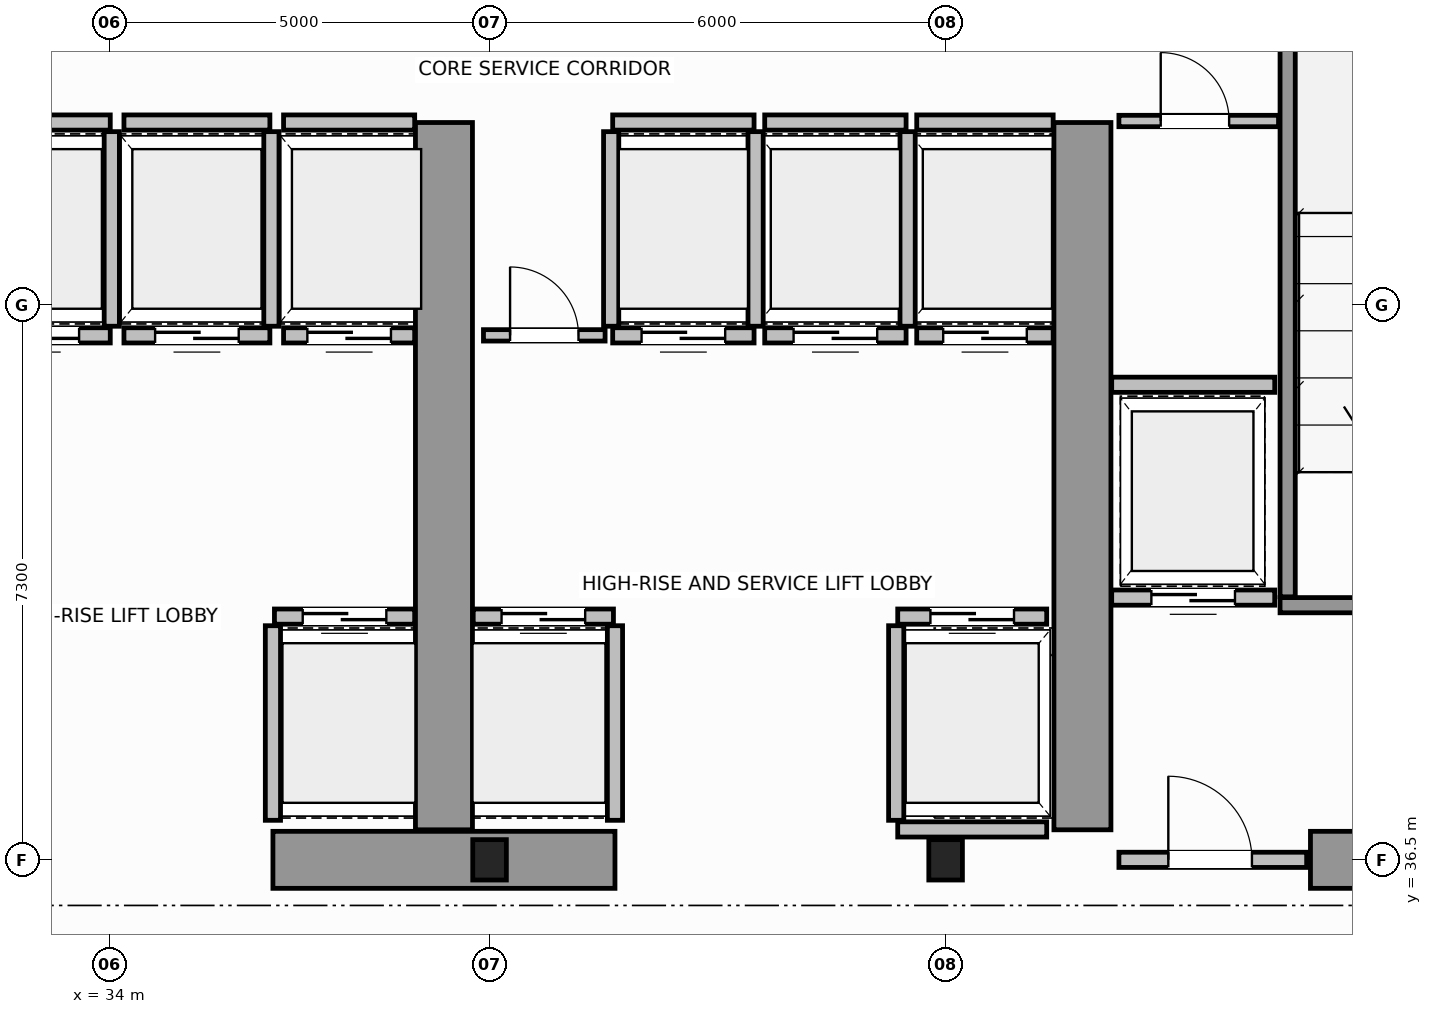
"""IFC4 building model, lengths in metres.
Left out: names, types, materials, properties, quantities, classifications, styles, units other than length and angle.
Written with IfcOpenShell. Run it as: python <this file> out.ifc"""

import sys

from ifc_helpers import new_model, si_unit, direction, frame, frame_2d, origin, origin_2d, place, context, subcontext, project, spatial, rectangle, i_section, extrude, source, transform, mapped, element, fill, save


model = new_model("IFC4")
c1 = context("Model", 3, precision=1e-05, world=origin(), true_north=direction((0.0, 1.0)))
c2 = subcontext(c1, "Body", "Model", "MODEL_VIEW")
j1 = project(units=[si_unit("LENGTHUNIT", "METRE"), si_unit("PLANEANGLEUNIT", "RADIAN")], contexts=[c1])
p1 = place(None, origin())
s1 = spatial("IfcSite", under=j1, at=p1, CompositionType="ELEMENT")
p2 = place(p1, origin())
s2 = spatial("IfcBuilding", under=s1, at=p2, CompositionType="ELEMENT")
p3 = place(p2, frame((0.0, 0.0, 99.6)))
s3 = spatial("IfcBuildingStorey", under=s2, at=p3, CompositionType="ELEMENT", Elevation=99.6)
m1 = source(origin(), c2, "Body", "SweptSolid", [
    extrude(i_section(OverallWidth=0.442, OverallDepth=0.531, WebThickness=0.065, FlangeThickness=0.076, FilletRadius=0.015, at=origin_2d()), origin(), (0.0, 0.0, 1.0), 3.8),
])
for number, where, z_axis, x_axis in (
    (1, (39.0, 36.5, 0.0), (0.0, 0.0, 1.0), (1.0, 0.0, 0.0)),
    (2, (45.0, 36.5, 0.0), (0.0, 0.0, 1.0), (1.0, 0.0, 0.0)),
):
    element("IfcColumn", number, at=place(p3, frame(where, z_axis=z_axis, x_axis=x_axis)), inside=s3, PredefinedType="COLUMN", context=c2, shape_type="MappedRepresentation", body=[
        mapped(m1, transform((0.0, 0.0, 0.0), scale=1.0)),
    ])
p4 = place(p3, frame((36.15, 36.5, 0.0), z_axis=(0.0, 0.0, 1.0), x_axis=(1.0, 0.0, 0.0)))
e3 = element("IfcWall", 3, at=p4, inside=s3, PredefinedType="SHEAR", context=c2, shape_type="SweptSolid", body=[
    extrude(rectangle(XDim=4.5, YDim=0.75, at=frame_2d((2.25, 0.0))), origin(), (0.0, 0.0, 1.0), 3.8),
])
p5 = place(p3, frame((49.8, 36.5, 0.0), z_axis=(0.0, 0.0, 1.0), x_axis=(1.0, 0.0, 0.0)))
e4 = element("IfcWall", 4, at=p5, inside=s3, PredefinedType="SHEAR", context=c2, shape_type="SweptSolid", body=[
    extrude(rectangle(XDim=3.805, YDim=0.75, at=frame_2d((1.902, 0.0))), origin(), (0.0, 0.0, 1.0), 2.38),
])
for number, where, z_axis, x_axis in (
    (5, (38.4, 36.895, 0.0), (0.0, 0.0, 1.0), (0.0, 1.0, 0.0)),
    (6, (46.8, 36.895, 0.0), (0.0, 0.0, 1.0), (0.0, 1.0, 0.0)),
):
    element("IfcWall", number, at=place(p3, frame(where, z_axis=z_axis, x_axis=x_axis)), inside=s3, PredefinedType="SHEAR", context=c2, shape_type="SweptSolid", body=[
        extrude(rectangle(XDim=9.305, YDim=0.75, at=frame_2d((4.652, 0.0))), origin(), (0.0, 0.0, 1.0), 3.8),
    ])
p6 = place(p3, frame((49.4, 39.85, 0.0), z_axis=(0.0, 0.0, 1.0), x_axis=(1.0, 0.0, 0.0)))
e7 = element("IfcWall", 7, at=p6, inside=s3, PredefinedType="SOLIDWALL", context=c2, shape_type="SweptSolid", body=[
    extrude(rectangle(XDim=4.225, YDim=0.2, at=frame_2d((2.113, 0.0))), origin(), (0.0, 0.0, 1.0), 3.8),
])
p7 = place(p6, frame((1.325, 0.0, 0.0)))
e8 = element("IfcOpeningElement", 8, at=p7, cuts=e7, PredefinedType="OPENING", context=c2, shape_type="SweptSolid", body=[
    extrude(rectangle(XDim=1.1, YDim=2.15, at=frame_2d((0.55, 1.075))), frame((0.0, 0.11, 0.0), z_axis=(0.0, -1.0, 0.0), x_axis=(1.0, 0.0, 0.0)), (0.0, 0.0, 1.0), 0.22),
])
p8 = place(p3, frame((49.5, 39.96, 0.0), z_axis=(0.0, 0.0, 1.0), x_axis=(0.0, 1.0, 0.0)))
e9 = element("IfcWall", 9, at=p8, inside=s3, PredefinedType="SOLIDWALL", context=c2, shape_type="SweptSolid", body=[
    extrude(rectangle(XDim=9.93, YDim=0.2, at=frame_2d((4.965, 0.0))), origin(), (0.0, 0.0, 1.0), 3.8),
])
p9 = place(p3, frame((47.28, 36.5, 0.0), z_axis=(0.0, 0.0, 1.0), x_axis=(1.0, 0.0, 0.0)))
e10 = element("IfcWall", 10, at=p9, inside=s3, PredefinedType="SOLIDWALL", context=c2, shape_type="SweptSolid", body=[
    extrude(rectangle(XDim=2.47, YDim=0.2, at=frame_2d((1.235, 0.0))), origin(), (0.0, 0.0, 1.0), 2.37),
])
p10 = place(p9, frame((0.65, 0.0, 0.0)))
e11 = element("IfcOpeningElement", 11, at=p10, cuts=e10, PredefinedType="OPENING", context=c2, shape_type="SweptSolid", body=[
    extrude(rectangle(XDim=1.1, YDim=2.15, at=frame_2d((0.55, 1.075))), frame((0.0, 0.11, 0.0), z_axis=(0.0, -1.0, 0.0), x_axis=(1.0, 0.0, 0.0)), (0.0, 0.0, 1.0), 0.22),
])
p11 = place(p3, frame((36.17, 39.7, 0.0), z_axis=(0.0, 0.0, 1.0), x_axis=(1.0, 0.0, 0.0)))
e12 = element("IfcWall", 12, at=p11, inside=s3, PredefinedType="SOLIDWALL", context=c2, shape_type="SweptSolid", body=[
    extrude(rectangle(XDim=1.845, YDim=0.2, at=frame_2d((0.922, 0.0))), origin(), (0.0, 0.0, 1.0), 3.58),
])
p12 = place(p11, frame((0.372, 0.0, 0.0)))
e13 = element("IfcOpeningElement", 13, at=p12, cuts=e12, PredefinedType="OPENING", context=c2, shape_type="SweptSolid", body=[
    extrude(rectangle(XDim=1.1, YDim=2.15, at=frame_2d((0.55, 1.075))), frame((0.0, 0.11, 0.0), z_axis=(0.0, -1.0, 0.0), x_axis=(1.0, 0.0, 0.0)), (0.0, 0.0, 1.0), 0.22),
])
p13 = place(p3, frame((36.15, 37.02, 0.0), z_axis=(0.0, 0.0, 1.0), x_axis=(0.0, 1.0, 0.0)))
e14 = element("IfcWall", 14, at=p13, inside=s3, PredefinedType="SOLIDWALL", context=c2, shape_type="SweptSolid", body=[
    extrude(rectangle(XDim=2.56, YDim=0.2, at=frame_2d((1.28, 0.0))), origin(), (0.0, 0.0, 1.0), 3.58),
])
p14 = place(p3, frame((32.09, 43.4, 0.0), z_axis=(0.0, 0.0, 1.0), x_axis=(1.0, 0.0, 0.0)))
e15 = element("IfcWall", 15, at=p14, inside=s3, PredefinedType="SOLIDWALL", context=c2, shape_type="SweptSolid", body=[
    extrude(rectangle(XDim=1.92, YDim=0.2, at=frame_2d((0.96, 0.0))), origin(), (0.0, 0.0, 1.0), 3.58),
])
p15 = place(p14, frame((0.41, 0.0, 0.0)))
e16 = element("IfcOpeningElement", 16, at=p15, cuts=e15, PredefinedType="OPENING", context=c2, shape_type="SweptSolid", body=[
    extrude(rectangle(XDim=1.1, YDim=2.15, at=frame_2d((0.55, 1.075))), frame((0.0, 0.11, 0.0), z_axis=(0.0, -1.0, 0.0), x_axis=(1.0, 0.0, 0.0)), (0.0, 0.0, 1.0), 0.22),
])
p16 = place(p3, frame((32.09, 46.2, 0.0), z_axis=(0.0, 0.0, 1.0), x_axis=(1.0, 0.0, 0.0)))
e17 = element("IfcWall", 17, at=p16, inside=s3, PredefinedType="SOLIDWALL", context=c2, shape_type="SweptSolid", body=[
    extrude(rectangle(XDim=1.92, YDim=0.2, at=frame_2d((0.96, 0.0))), origin(), (0.0, 0.0, 1.0), 3.58),
])
p17 = place(p3, frame((34.03, 43.52, 0.0), z_axis=(0.0, 0.0, 1.0), x_axis=(0.0, 1.0, 0.0)))
e18 = element("IfcWall", 18, at=p17, inside=s3, PredefinedType="SOLIDWALL", context=c2, shape_type="SweptSolid", body=[
    extrude(rectangle(XDim=2.56, YDim=0.2, at=frame_2d((1.28, 0.0))), origin(), (0.0, 0.0, 1.0), 3.58),
])
p18 = place(p3, frame((34.19, 43.4, 0.0), z_axis=(0.0, 0.0, 1.0), x_axis=(1.0, 0.0, 0.0)))
e19 = element("IfcWall", 19, at=p18, inside=s3, PredefinedType="SOLIDWALL", context=c2, shape_type="SweptSolid", body=[
    extrude(rectangle(XDim=1.92, YDim=0.2, at=frame_2d((0.96, 0.0))), origin(), (0.0, 0.0, 1.0), 3.58),
])
p19 = place(p18, frame((0.41, 0.0, 0.0)))
e20 = element("IfcOpeningElement", 20, at=p19, cuts=e19, PredefinedType="OPENING", context=c2, shape_type="SweptSolid", body=[
    extrude(rectangle(XDim=1.1, YDim=2.15, at=frame_2d((0.55, 1.075))), frame((0.0, 0.11, 0.0), z_axis=(0.0, -1.0, 0.0), x_axis=(1.0, 0.0, 0.0)), (0.0, 0.0, 1.0), 0.22),
])
p20 = place(p3, frame((34.19, 46.2, 0.0), z_axis=(0.0, 0.0, 1.0), x_axis=(1.0, 0.0, 0.0)))
e21 = element("IfcWall", 21, at=p20, inside=s3, PredefinedType="SOLIDWALL", context=c2, shape_type="SweptSolid", body=[
    extrude(rectangle(XDim=1.92, YDim=0.2, at=frame_2d((0.96, 0.0))), origin(), (0.0, 0.0, 1.0), 3.58),
])
p21 = place(p3, frame((36.13, 43.52, 0.0), z_axis=(0.0, 0.0, 1.0), x_axis=(0.0, 1.0, 0.0)))
e22 = element("IfcWall", 22, at=p21, inside=s3, PredefinedType="SOLIDWALL", context=c2, shape_type="SweptSolid", body=[
    extrude(rectangle(XDim=2.56, YDim=0.2, at=frame_2d((1.28, 0.0))), origin(), (0.0, 0.0, 1.0), 3.58),
])
p22 = place(p3, frame((36.29, 43.4, 0.0), z_axis=(0.0, 0.0, 1.0), x_axis=(1.0, 0.0, 0.0)))
e23 = element("IfcWall", 23, at=p22, inside=s3, PredefinedType="SOLIDWALL", context=c2, shape_type="SweptSolid", body=[
    extrude(rectangle(XDim=1.725, YDim=0.2, at=frame_2d((0.862, 0.0))), origin(), (0.0, 0.0, 1.0), 3.58),
])
p23 = place(p22, frame((0.313, 0.0, 0.0)))
e24 = element("IfcOpeningElement", 24, at=p23, cuts=e23, PredefinedType="OPENING", context=c2, shape_type="SweptSolid", body=[
    extrude(rectangle(XDim=1.1, YDim=2.15, at=frame_2d((0.55, 1.075))), frame((0.0, 0.11, 0.0), z_axis=(0.0, -1.0, 0.0), x_axis=(1.0, 0.0, 0.0)), (0.0, 0.0, 1.0), 0.22),
])
p24 = place(p3, frame((36.29, 46.2, 0.0), z_axis=(0.0, 0.0, 1.0), x_axis=(1.0, 0.0, 0.0)))
e25 = element("IfcWall", 25, at=p24, inside=s3, PredefinedType="SOLIDWALL", context=c2, shape_type="SweptSolid", body=[
    extrude(rectangle(XDim=1.725, YDim=0.2, at=frame_2d((0.862, 0.0))), origin(), (0.0, 0.0, 1.0), 3.58),
])
p25 = place(p3, frame((38.785, 39.7, 0.0), z_axis=(0.0, 0.0, 1.0), x_axis=(1.0, 0.0, 0.0)))
e26 = element("IfcWall", 26, at=p25, inside=s3, PredefinedType="SOLIDWALL", context=c2, shape_type="SweptSolid", body=[
    extrude(rectangle(XDim=1.845, YDim=0.2, at=frame_2d((0.922, 0.0))), origin(), (0.0, 0.0, 1.0), 3.58),
])
p26 = place(p25, frame((0.373, 0.0, 0.0)))
e27 = element("IfcOpeningElement", 27, at=p26, cuts=e26, PredefinedType="OPENING", context=c2, shape_type="SweptSolid", body=[
    extrude(rectangle(XDim=1.1, YDim=2.15, at=frame_2d((0.55, 1.075))), frame((0.0, 0.11, 0.0), z_axis=(0.0, -1.0, 0.0), x_axis=(1.0, 0.0, 0.0)), (0.0, 0.0, 1.0), 0.22),
])
p27 = place(p3, frame((40.65, 37.02, 0.0), z_axis=(0.0, 0.0, 1.0), x_axis=(0.0, 1.0, 0.0)))
e28 = element("IfcWall", 28, at=p27, inside=s3, PredefinedType="SOLIDWALL", context=c2, shape_type="SweptSolid", body=[
    extrude(rectangle(XDim=2.56, YDim=0.2, at=frame_2d((1.28, 0.0))), origin(), (0.0, 0.0, 1.0), 3.58),
])
p28 = place(p3, frame((44.37, 39.7, 0.0), z_axis=(0.0, 0.0, 1.0), x_axis=(1.0, 0.0, 0.0)))
e29 = element("IfcWall", 29, at=p28, inside=s3, PredefinedType="SOLIDWALL", context=c2, shape_type="SweptSolid", body=[
    extrude(rectangle(XDim=1.96, YDim=0.2, at=frame_2d((0.98, 0.0))), origin(), (0.0, 0.0, 1.0), 3.58),
])
p29 = place(p28, frame((0.43, 0.0, 0.0)))
e30 = element("IfcOpeningElement", 30, at=p29, cuts=e29, PredefinedType="OPENING", context=c2, shape_type="SweptSolid", body=[
    extrude(rectangle(XDim=1.1, YDim=2.15, at=frame_2d((0.55, 1.075))), frame((0.0, 0.11, 0.0), z_axis=(0.0, -1.0, 0.0), x_axis=(1.0, 0.0, 0.0)), (0.0, 0.0, 1.0), 0.22),
])
p30 = place(p3, frame((44.37, 36.9, 0.0), z_axis=(0.0, 0.0, 1.0), x_axis=(1.0, 0.0, 0.0)))
e31 = element("IfcWall", 31, at=p30, inside=s3, PredefinedType="SOLIDWALL", context=c2, shape_type="SweptSolid", body=[
    extrude(rectangle(XDim=1.96, YDim=0.2, at=frame_2d((0.98, 0.0))), origin(), (0.0, 0.0, 1.0), 2.37),
])
p31 = place(p3, frame((44.35, 37.02, 0.0), z_axis=(0.0, 0.0, 1.0), x_axis=(0.0, 1.0, 0.0)))
e32 = element("IfcWall", 32, at=p31, inside=s3, PredefinedType="SOLIDWALL", context=c2, shape_type="SweptSolid", body=[
    extrude(rectangle(XDim=2.56, YDim=0.2, at=frame_2d((1.28, 0.0))), origin(), (0.0, 0.0, 1.0), 3.58),
])
p32 = place(p3, frame((40.62, 43.4, 0.0), z_axis=(0.0, 0.0, 1.0), x_axis=(1.0, 0.0, 0.0)))
e33 = element("IfcWall", 33, at=p32, inside=s3, PredefinedType="SOLIDWALL", context=c2, shape_type="SweptSolid", body=[
    extrude(rectangle(XDim=1.86, YDim=0.2, at=frame_2d((0.93, 0.0))), origin(), (0.0, 0.0, 1.0), 3.58),
])
p33 = place(p32, frame((0.38, 0.0, 0.0)))
e34 = element("IfcOpeningElement", 34, at=p33, cuts=e33, PredefinedType="OPENING", context=c2, shape_type="SweptSolid", body=[
    extrude(rectangle(XDim=1.1, YDim=2.15, at=frame_2d((0.55, 1.075))), frame((0.0, 0.11, 0.0), z_axis=(0.0, -1.0, 0.0), x_axis=(1.0, 0.0, 0.0)), (0.0, 0.0, 1.0), 0.22),
])
p34 = place(p3, frame((40.62, 46.2, 0.0), z_axis=(0.0, 0.0, 1.0), x_axis=(1.0, 0.0, 0.0)))
e35 = element("IfcWall", 35, at=p34, inside=s3, PredefinedType="SOLIDWALL", context=c2, shape_type="SweptSolid", body=[
    extrude(rectangle(XDim=1.86, YDim=0.2, at=frame_2d((0.93, 0.0))), origin(), (0.0, 0.0, 1.0), 3.58),
])
for number, where, z_axis, x_axis in (
    (36, (40.6, 43.52, 0.0), (0.0, 0.0, 1.0), (0.0, 1.0, 0.0)),
    (37, (42.5, 43.52, 0.0), (0.0, 0.0, 1.0), (0.0, 1.0, 0.0)),
):
    element("IfcWall", number, at=place(p3, frame(where, z_axis=z_axis, x_axis=x_axis)), inside=s3, PredefinedType="SOLIDWALL", context=c2, shape_type="SweptSolid", body=[
        extrude(rectangle(XDim=2.56, YDim=0.2, at=frame_2d((1.28, 0.0))), origin(), (0.0, 0.0, 1.0), 3.58),
    ])
p35 = place(p3, frame((42.62, 43.4, 0.0), z_axis=(0.0, 0.0, 1.0), x_axis=(1.0, 0.0, 0.0)))
e38 = element("IfcWall", 38, at=p35, inside=s3, PredefinedType="SOLIDWALL", context=c2, shape_type="SweptSolid", body=[
    extrude(rectangle(XDim=1.86, YDim=0.2, at=frame_2d((0.93, 0.0))), origin(), (0.0, 0.0, 1.0), 3.58),
])
p36 = place(p35, frame((0.38, 0.0, 0.0)))
e39 = element("IfcOpeningElement", 39, at=p36, cuts=e38, PredefinedType="OPENING", context=c2, shape_type="SweptSolid", body=[
    extrude(rectangle(XDim=1.1, YDim=2.15, at=frame_2d((0.55, 1.075))), frame((0.0, 0.11, 0.0), z_axis=(0.0, -1.0, 0.0), x_axis=(1.0, 0.0, 0.0)), (0.0, 0.0, 1.0), 0.22),
])
p37 = place(p3, frame((42.62, 46.2, 0.0), z_axis=(0.0, 0.0, 1.0), x_axis=(1.0, 0.0, 0.0)))
e40 = element("IfcWall", 40, at=p37, inside=s3, PredefinedType="SOLIDWALL", context=c2, shape_type="SweptSolid", body=[
    extrude(rectangle(XDim=1.86, YDim=0.2, at=frame_2d((0.93, 0.0))), origin(), (0.0, 0.0, 1.0), 3.58),
])
p38 = place(p3, frame((44.5, 43.52, 0.0), z_axis=(0.0, 0.0, 1.0), x_axis=(0.0, 1.0, 0.0)))
e41 = element("IfcWall", 41, at=p38, inside=s3, PredefinedType="SOLIDWALL", context=c2, shape_type="SweptSolid", body=[
    extrude(rectangle(XDim=2.56, YDim=0.2, at=frame_2d((1.28, 0.0))), origin(), (0.0, 0.0, 1.0), 3.58),
])
p39 = place(p3, frame((44.62, 43.4, 0.0), z_axis=(0.0, 0.0, 1.0), x_axis=(1.0, 0.0, 0.0)))
e42 = element("IfcWall", 42, at=p39, inside=s3, PredefinedType="SOLIDWALL", context=c2, shape_type="SweptSolid", body=[
    extrude(rectangle(XDim=1.795, YDim=0.2, at=frame_2d((0.897, 0.0))), origin(), (0.0, 0.0, 1.0), 3.58),
])
p40 = place(p39, frame((0.348, 0.0, 0.0)))
e43 = element("IfcOpeningElement", 43, at=p40, cuts=e42, PredefinedType="OPENING", context=c2, shape_type="SweptSolid", body=[
    extrude(rectangle(XDim=1.1, YDim=2.15, at=frame_2d((0.55, 1.075))), frame((0.0, 0.11, 0.0), z_axis=(0.0, -1.0, 0.0), x_axis=(1.0, 0.0, 0.0)), (0.0, 0.0, 1.0), 0.22),
])
p41 = place(p3, frame((44.62, 46.2, 0.0), z_axis=(0.0, 0.0, 1.0), x_axis=(1.0, 0.0, 0.0)))
e44 = element("IfcWall", 44, at=p41, inside=s3, PredefinedType="SOLIDWALL", context=c2, shape_type="SweptSolid", body=[
    extrude(rectangle(XDim=1.795, YDim=0.2, at=frame_2d((0.897, 0.0))), origin(), (0.0, 0.0, 1.0), 3.58),
])
p42 = place(p3, frame((47.185, 39.95, 0.0), z_axis=(0.0, 0.0, 1.0), x_axis=(1.0, 0.0, 0.0)))
e45 = element("IfcWall", 45, at=p42, inside=s3, PredefinedType="SOLIDWALL", context=c2, shape_type="SweptSolid", body=[
    extrude(rectangle(XDim=2.145, YDim=0.2, at=frame_2d((1.073, 0.0))), origin(), (0.0, 0.0, 1.0), 3.58),
])
p43 = place(p42, frame((0.522, 0.0, 0.0)))
e46 = element("IfcOpeningElement", 46, at=p43, cuts=e45, PredefinedType="OPENING", context=c2, shape_type="SweptSolid", body=[
    extrude(rectangle(XDim=1.1, YDim=2.15, at=frame_2d((0.55, 1.075))), frame((0.0, 0.11, 0.0), z_axis=(0.0, -1.0, 0.0), x_axis=(1.0, 0.0, 0.0)), (0.0, 0.0, 1.0), 0.22),
])
p44 = place(p3, frame((47.185, 42.75, 0.0), z_axis=(0.0, 0.0, 1.0), x_axis=(1.0, 0.0, 0.0)))
e47 = element("IfcWall", 47, at=p44, inside=s3, PredefinedType="SOLIDWALL", context=c2, shape_type="SweptSolid", body=[
    extrude(rectangle(XDim=2.145, YDim=0.2, at=frame_2d((1.073, 0.0))), origin(), (0.0, 0.0, 1.0), 3.58),
])
p45 = place(p3, frame((47.28, 46.22, 0.0), z_axis=(0.0, 0.0, 1.0), x_axis=(1.0, 0.0, 0.0)))
e48 = element("IfcWall", 48, at=p45, inside=s3, PredefinedType="PARTITIONING", context=c2, shape_type="SweptSolid", body=[
    extrude(rectangle(XDim=2.1, YDim=0.15, at=frame_2d((1.05, 0.0))), origin(), (0.0, 0.0, 1.0), 3.58),
])
p46 = place(p45, frame((0.55, 0.0, 0.0)))
e49 = element("IfcOpeningElement", 49, at=p46, cuts=e48, PredefinedType="OPENING", context=c2, shape_type="SweptSolid", body=[
    extrude(rectangle(XDim=0.9, YDim=2.1, at=frame_2d((0.45, 1.05))), frame((0.0, 0.085, 0.0), z_axis=(0.0, -1.0, 0.0), x_axis=(1.0, 0.0, 0.0)), (0.0, 0.0, 1.0), 0.17),
])
p47 = place(p3, frame((38.92, 43.4, 0.0), z_axis=(0.0, 0.0, 1.0), x_axis=(1.0, 0.0, 0.0)))
e50 = element("IfcWall", 50, at=p47, inside=s3, PredefinedType="PARTITIONING", context=c2, shape_type="SweptSolid", body=[
    extrude(rectangle(XDim=1.6, YDim=0.15, at=frame_2d((0.8, 0.0))), origin(), (0.0, 0.0, 1.0), 3.58),
])
p48 = place(p47, frame((0.35, 0.0, 0.0)))
e51 = element("IfcOpeningElement", 51, at=p48, cuts=e50, PredefinedType="OPENING", context=c2, shape_type="SweptSolid", body=[
    extrude(rectangle(XDim=0.9, YDim=2.1, at=frame_2d((0.45, 1.05))), frame((0.0, 0.085, 0.0), z_axis=(0.0, -1.0, 0.0), x_axis=(1.0, 0.0, 0.0)), (0.0, 0.0, 1.0), 0.17),
])
m2 = source(origin(), c2, "Body", "SweptSolid", [
    extrude(rectangle(XDim=1.1, YDim=2.15, at=frame_2d((0.55, 1.075))), frame((0.0, 0.025, 0.0), z_axis=(0.0, -1.0, 0.0), x_axis=(1.0, 0.0, 0.0)), (0.0, 0.0, 1.0), 0.05),
])
p49 = place(p10, origin())
e52 = element("IfcDoor", 52, at=p49, inside=s3, OperationType="SINGLE_SWING_LEFT", PredefinedType="DOOR", context=c2, shape_type="MappedRepresentation", body=[
    mapped(m2, transform((0.0, 0.0, 0.0), scale=1.0)),
])
fill(e11, e52)
p50 = place(p12, origin())
e53 = element("IfcDoor", 53, at=p50, inside=s3, OperationType="DOUBLE_DOOR_SLIDING", PredefinedType="DOOR", context=c2, shape_type="MappedRepresentation", body=[
    mapped(m2, transform((0.0, 0.0, 0.0), scale=1.0)),
])
fill(e13, e53)
p51 = place(p15, origin())
e54 = element("IfcDoor", 54, at=p51, inside=s3, OperationType="DOUBLE_DOOR_SLIDING", PredefinedType="DOOR", context=c2, shape_type="MappedRepresentation", body=[
    mapped(m2, transform((0.0, 0.0, 0.0), scale=1.0)),
])
fill(e16, e54)
p52 = place(p19, origin())
e55 = element("IfcDoor", 55, at=p52, inside=s3, OperationType="DOUBLE_DOOR_SLIDING", PredefinedType="DOOR", context=c2, shape_type="MappedRepresentation", body=[
    mapped(m2, transform((0.0, 0.0, 0.0), scale=1.0)),
])
fill(e20, e55)
p53 = place(p23, origin())
e56 = element("IfcDoor", 56, at=p53, inside=s3, OperationType="DOUBLE_DOOR_SLIDING", PredefinedType="DOOR", context=c2, shape_type="MappedRepresentation", body=[
    mapped(m2, transform((0.0, 0.0, 0.0), scale=1.0)),
])
fill(e24, e56)
p54 = place(p26, origin())
e57 = element("IfcDoor", 57, at=p54, inside=s3, OperationType="DOUBLE_DOOR_SLIDING", PredefinedType="DOOR", context=c2, shape_type="MappedRepresentation", body=[
    mapped(m2, transform((0.0, 0.0, 0.0), scale=1.0)),
])
fill(e27, e57)
p55 = place(p29, origin())
e58 = element("IfcDoor", 58, at=p55, inside=s3, OperationType="DOUBLE_DOOR_SLIDING", PredefinedType="DOOR", context=c2, shape_type="MappedRepresentation", body=[
    mapped(m2, transform((0.0, 0.0, 0.0), scale=1.0)),
])
fill(e30, e58)
p56 = place(p33, origin())
e59 = element("IfcDoor", 59, at=p56, inside=s3, OperationType="DOUBLE_DOOR_SLIDING", PredefinedType="DOOR", context=c2, shape_type="MappedRepresentation", body=[
    mapped(m2, transform((0.0, 0.0, 0.0), scale=1.0)),
])
fill(e34, e59)
p57 = place(p36, origin())
e60 = element("IfcDoor", 60, at=p57, inside=s3, OperationType="DOUBLE_DOOR_SLIDING", PredefinedType="DOOR", context=c2, shape_type="MappedRepresentation", body=[
    mapped(m2, transform((0.0, 0.0, 0.0), scale=1.0)),
])
fill(e39, e60)
p58 = place(p40, origin())
e61 = element("IfcDoor", 61, at=p58, inside=s3, OperationType="DOUBLE_DOOR_SLIDING", PredefinedType="DOOR", context=c2, shape_type="MappedRepresentation", body=[
    mapped(m2, transform((0.0, 0.0, 0.0), scale=1.0)),
])
fill(e43, e61)
p59 = place(p43, origin())
e62 = element("IfcDoor", 62, at=p59, inside=s3, OperationType="DOUBLE_DOOR_SLIDING", PredefinedType="DOOR", context=c2, shape_type="MappedRepresentation", body=[
    mapped(m2, transform((0.0, 0.0, 0.0), scale=1.0)),
])
fill(e46, e62)
m3 = source(origin(), c2, "Body", "SweptSolid", [
    extrude(rectangle(XDim=0.9, YDim=2.1, at=frame_2d((0.45, 1.05))), frame((0.0, 0.025, 0.0), z_axis=(0.0, -1.0, 0.0), x_axis=(1.0, 0.0, 0.0)), (0.0, 0.0, 1.0), 0.05),
])
p60 = place(p46, origin())
e63 = element("IfcDoor", 63, at=p60, inside=s3, OperationType="SINGLE_SWING_RIGHT", PredefinedType="DOOR", context=c2, shape_type="MappedRepresentation", body=[
    mapped(m3, transform((0.0, 0.0, 0.0), scale=1.0)),
])
fill(e49, e63)
p61 = place(p48, origin())
e64 = element("IfcDoor", 64, at=p61, inside=s3, OperationType="SINGLE_SWING_LEFT", PredefinedType="DOOR", context=c2, shape_type="MappedRepresentation", body=[
    mapped(m3, transform((0.0, 0.0, 0.0), scale=1.0)),
])
fill(e51, e64)
save(model, sys.argv[1])
